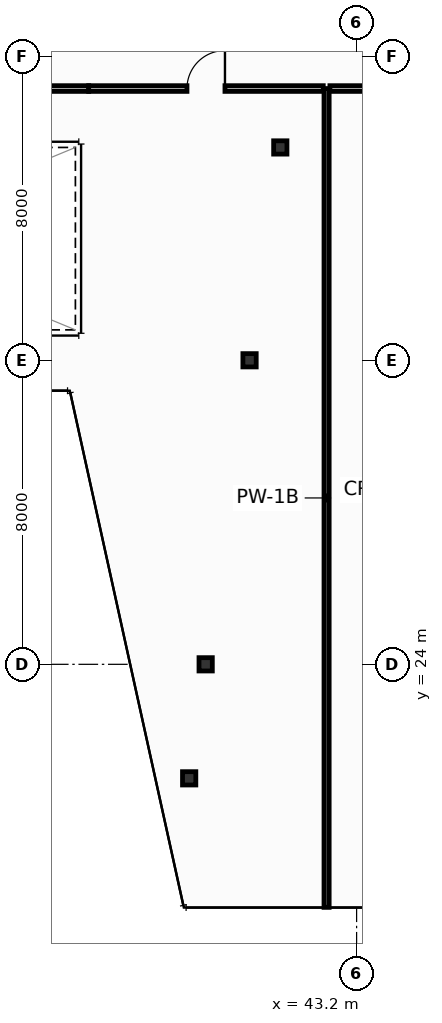
"""IFC4 building model, lengths in metres.
Left out: names, types, materials, properties, quantities, classifications, styles, units other than length and angle.
Written with IfcOpenShell. Run it as: python <this file> out.ifc"""

import sys

from ifc_helpers import new_model, si_unit, direction, frame, frame_2d, origin, origin_2d, place, context, subcontext, project, spatial, rectangle, hollow_rectangle, extrude, element, fill, save


model = new_model("IFC4")
c1 = context("Model", 3, precision=1e-05, world=origin(), true_north=direction((0.0, 1.0)))
c2 = subcontext(c1, "Body", "Model", "MODEL_VIEW")
j1 = project(units=[si_unit("LENGTHUNIT", "METRE"), si_unit("PLANEANGLEUNIT", "RADIAN")], contexts=[c1])
p1 = place(None, origin())
s1 = spatial("IfcSite", under=j1, at=p1, CompositionType="ELEMENT")
p2 = place(p1, origin())
s2 = spatial("IfcBuilding", under=s1, at=p2, CompositionType="ELEMENT")
p3 = place(p2, frame((0.0, 0.0, 238.2)))
s3 = spatial("IfcBuildingStorey", under=s2, at=p3, CompositionType="ELEMENT", Elevation=238.2)
for number, where, z_axis, x_axis in (
    (1, (38.794, 21.0, 0.0), (0.0, 0.0, 1.0), (1.0, 0.0, 0.0)),
    (2, (39.228, 24.0, 0.0), (0.0, 0.0, 1.0), (1.0, 0.0, 0.0)),
    (3, (40.383, 32.0, 0.0), (0.0, 0.0, 1.0), (1.0, 0.0, 0.0)),
    (4, (41.192, 37.6, 0.0), (0.0, 0.0, 1.0), (1.0, 0.0, 0.0)),
):
    element("IfcColumn", number, at=place(p3, frame(where, z_axis=z_axis, x_axis=x_axis)), inside=s3, PredefinedType="COLUMN", context=c2, shape_type="SweptSolid", body=[
        extrude(hollow_rectangle(XDim=0.35, YDim=0.35, WallThickness=0.016, at=origin_2d()), origin(), (0.0, 0.0, 1.0), 3.8),
    ])
p4 = place(p3, frame((42.41, 17.605, 0.0), z_axis=(0.0, 0.0, 1.0), x_axis=(0.0, 1.0, 0.0)))
e5 = element("IfcWall", 5, at=p4, inside=s3, PredefinedType="PARTITIONING", context=c2, shape_type="SweptSolid", body=[
    extrude(rectangle(XDim=21.545, YDim=0.135, at=frame_2d((10.772, 0.0))), origin(), (0.0, 0.0, 1.0), 2.947),
])
p5 = place(p3, frame((23.85, 39.15, 0.0), z_axis=(0.0, 0.0, 1.0), x_axis=(1.0, 0.0, 0.0)))
e6 = element("IfcWall", 6, at=p5, inside=s3, PredefinedType="PARTITIONING", context=c2, shape_type="SweptSolid", body=[
    extrude(rectangle(XDim=12.3, YDim=0.15, at=frame_2d((6.15, 0.0))), origin(), (0.0, 0.0, 1.0), 3.55),
])
p6 = place(p3, frame((36.15, 39.15, 0.0), z_axis=(0.0, 0.0, 1.0), x_axis=(1.0, 0.0, 0.0)))
e7 = element("IfcWall", 7, at=p6, inside=s3, PredefinedType="PARTITIONING", context=c2, shape_type="SweptSolid", body=[
    extrude(rectangle(XDim=6.173, YDim=0.15, at=frame_2d((3.086, 0.0))), origin(), (0.0, 0.0, 1.0), 2.947),
])
p7 = place(p6, frame((2.586, 0.0, 0.0)))
e8 = element("IfcOpeningElement", 8, at=p7, cuts=e7, PredefinedType="OPENING", context=c2, shape_type="SweptSolid", body=[
    extrude(rectangle(XDim=1.0, YDim=2.15, at=frame_2d((0.5, 1.075))), frame((0.0, 0.085, 0.0), z_axis=(0.0, -1.0, 0.0), x_axis=(1.0, 0.0, 0.0)), (0.0, 0.0, 1.0), 0.17),
])
p8 = place(p3, frame((42.498, 39.15, 0.0), z_axis=(0.0, 0.0, 1.0), x_axis=(1.0, 0.0, 0.0)))
e9 = element("IfcWall", 9, at=p8, inside=s3, PredefinedType="PARTITIONING", context=c2, shape_type="SweptSolid", body=[
    extrude(rectangle(XDim=5.555, YDim=0.15, at=frame_2d((2.777, 0.0))), origin(), (0.0, 0.0, 1.0), 3.55),
])
p9 = place(p8, frame((2.252, 0.0, 0.0)))
e10 = element("IfcOpeningElement", 10, at=p9, cuts=e9, PredefinedType="OPENING", context=c2, shape_type="SweptSolid", body=[
    extrude(rectangle(XDim=1.05, YDim=2.15, at=frame_2d((0.525, 1.075))), frame((0.0, 0.085, 0.0), z_axis=(0.0, -1.0, 0.0), x_axis=(1.0, 0.0, 0.0)), (0.0, 0.0, 1.0), 0.17),
])
p10 = place(p7, origin())
e11 = element("IfcDoor", 11, at=p10, inside=s3, OperationType="SINGLE_SWING_RIGHT", PredefinedType="DOOR", context=c2, shape_type="SweptSolid", body=[
    extrude(rectangle(XDim=1.0, YDim=2.15, at=frame_2d((0.5, 1.075))), frame((0.0, 0.025, 0.0), z_axis=(0.0, -1.0, 0.0), x_axis=(1.0, 0.0, 0.0)), (0.0, 0.0, 1.0), 0.05),
])
fill(e8, e11)
save(model, sys.argv[1])
